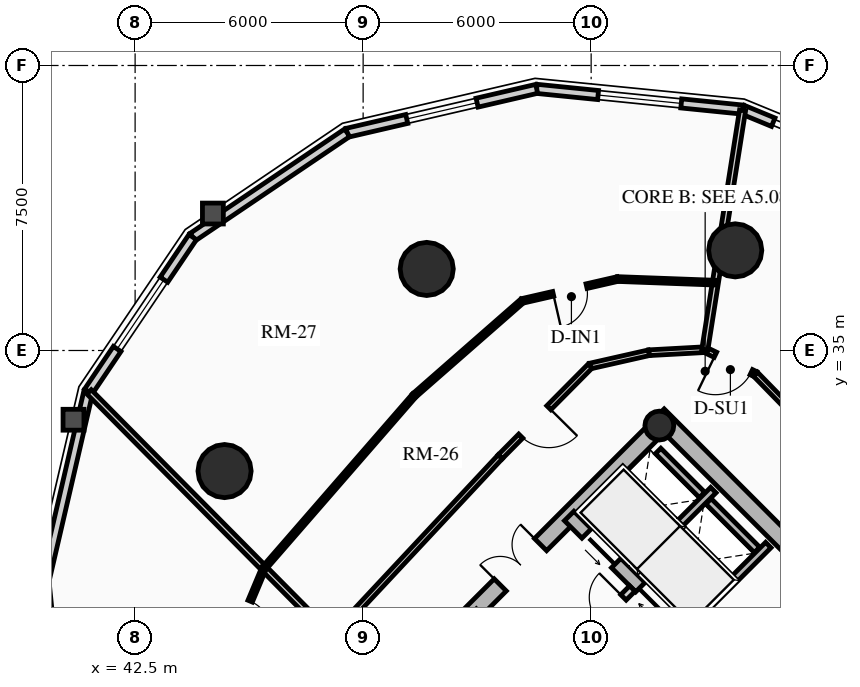
"""IFC4 building model, lengths in metres.
Left out: names, types, materials, properties, quantities, classifications, styles, units other than length and angle.
Written with IfcOpenShell. Run it as: python <this file> out.ifc"""

import sys

from ifc_helpers import new_model, si_unit, direction, frame, frame_2d, origin, origin_2d, place, context, subcontext, project, spatial, rectangle, circle, hollow_circle, extrude, source, transform, mapped, element, fill, save


model = new_model("IFC4")
c1 = context("Model", 3, precision=1e-05, world=origin(), true_north=direction((0.0, 1.0)))
c2 = subcontext(c1, "Body", "Model", "MODEL_VIEW")
j1 = project(units=[si_unit("LENGTHUNIT", "METRE"), si_unit("PLANEANGLEUNIT", "RADIAN")], contexts=[c1])
p1 = place(None, origin())
s1 = spatial("IfcSite", under=j1, at=p1, CompositionType="ELEMENT")
p2 = place(p1, origin())
s2 = spatial("IfcBuilding", under=s1, at=p2, CompositionType="ELEMENT")
p3 = place(p2, frame((0.0, 0.0, 90.52)))
s3 = spatial("IfcBuildingStorey", under=s2, at=p3, CompositionType="ELEMENT", Elevation=90.52)
p4 = place(p3, frame((66.303, 23.263, 0.0), z_axis=(0.0, 0.0, 1.0), x_axis=(-0.707106781187, 0.707106781187, 0.0)))
e1 = element("IfcWall", 1, at=p4, inside=s3, PredefinedType="SHEAR", context=c2, shape_type="SweptSolid", body=[
    extrude(rectangle(XDim=14.2, YDim=0.45, at=frame_2d((7.1, 0.0))), origin(), (0.0, 0.0, 1.0), 2.91),
])
p5 = place(p3, frame((48.856, 25.578, 0.0), z_axis=(0.0, 0.0, 1.0), x_axis=(0.707106781187, 0.707106781187, 0.0)))
e2 = element("IfcWall", 2, at=p5, inside=s3, PredefinedType="SHEAR", context=c2, shape_type="SweptSolid", body=[
    extrude(rectangle(XDim=10.7, YDim=0.45, at=frame_2d((5.35, 0.0))), origin(), (0.0, 0.0, 1.0), 2.91),
])
m1 = source(origin(), c2, "Body", "SweptSolid", [
    extrude(rectangle(XDim=1.5, YDim=2.02, at=frame_2d((0.75, 1.01))), frame((0.0, 0.235, 0.0), z_axis=(0.0, -1.0, 0.0), x_axis=(1.0, 0.0, 0.0)), (0.0, 0.0, 1.0), 0.47),
])
p6 = place(p5, frame((4.6, 0.0, 0.0)))
e3 = element("IfcOpeningElement", 3, at=p6, cuts=e2, PredefinedType="OPENING", context=c2, shape_type="MappedRepresentation", body=[
    mapped(m1, transform((0.0, 0.0, 0.0), x_axis=(1.0, 0.0, 0.0), y_axis=(0.0, 1.0, 0.0), z_axis=(0.0, 0.0, 1.0), scale=1.0)),
])
p7 = place(p3, frame((63.645, 20.922, 0.0), z_axis=(0.0, 0.0, 1.0), x_axis=(-0.707106781187, 0.707106781187, 0.0)))
e4 = element("IfcWall", 4, at=p7, inside=s3, PredefinedType="SHEAR", context=c2, shape_type="SweptSolid", body=[
    extrude(rectangle(XDim=13.75, YDim=0.35, at=frame_2d((6.875, 0.0))), origin(), (0.0, 0.0, 1.0), 2.91),
])
m2 = source(origin(), c2, "Body", "SweptSolid", [
    extrude(rectangle(XDim=1.1, YDim=2.015, at=frame_2d((0.55, 1.007))), frame((0.0, 0.185, 0.0), z_axis=(0.0, -1.0, 0.0), x_axis=(1.0, 0.0, 0.0)), (0.0, 0.0, 1.0), 0.37),
])
p8 = place(p7, frame((10.0, 0.0, 0.0)))
e5 = element("IfcOpeningElement", 5, at=p8, cuts=e4, PredefinedType="OPENING", context=c2, shape_type="MappedRepresentation", body=[
    mapped(m2, transform((0.0, 0.0, 0.0), x_axis=(1.0, 0.0, 0.0), y_axis=(0.0, 1.0, 0.0), z_axis=(0.0, 0.0, 1.0), scale=1.0)),
])
p9 = place(p7, frame((12.0, 0.0, 0.0)))
e6 = element("IfcOpeningElement", 6, at=p9, cuts=e4, PredefinedType="OPENING", context=c2, shape_type="MappedRepresentation", body=[
    mapped(m2, transform((0.0, 0.0, 0.0), x_axis=(1.0, 0.0, 0.0), y_axis=(0.0, 1.0, 0.0), z_axis=(0.0, 0.0, 1.0), scale=1.0)),
])
m3 = source(origin(), c2, "Body", "SweptSolid", [
    extrude(rectangle(XDim=1.15, YDim=2.02, at=frame_2d((0.575, 1.01))), frame((0.0, 0.185, 0.0), z_axis=(0.0, -1.0, 0.0), x_axis=(1.0, 0.0, 0.0)), (0.0, 0.0, 1.0), 0.37),
])
p10 = place(p7, frame((5.305, 0.0, 0.0)))
e7 = element("IfcOpeningElement", 7, at=p10, cuts=e4, PredefinedType="OPENING", context=c2, shape_type="MappedRepresentation", body=[
    mapped(m3, transform((0.0, 0.0, 0.0), x_axis=(1.0, 0.0, 0.0), y_axis=(0.0, 1.0, 0.0), z_axis=(0.0, 0.0, 1.0), scale=1.0)),
])
p11 = place(p3, frame((56.294, 33.024, 0.0), z_axis=(0.0, 0.0, 1.0), x_axis=(0.707106781187, 0.707106781187, 0.0)))
e8 = element("IfcColumn", 8, at=p11, inside=s3, PredefinedType="COLUMN", context=c2, shape_type="SweptSolid", body=[
    extrude(hollow_circle(Radius=0.38, WallThickness=0.032, at=origin_2d()), origin(), (0.0, 0.0, 1.0), 2.91),
])
for number, where, z_axis, x_axis in (
    (9, (58.291, 37.635, 0.0), (0.0, 0.0, 1.0), (1.0, 0.0, 0.0)),
    (10, (50.173, 37.146, 0.0), (0.0, 0.0, 1.0), (1.0, 0.0, 0.0)),
    (11, (44.854, 31.827, 0.0), (0.0, 0.0, 1.0), (1.0, 0.0, 0.0)),
):
    element("IfcColumn", number, at=place(p3, frame(where, z_axis=z_axis, x_axis=x_axis)), inside=s3, PredefinedType="USERDEFINED", context=c2, shape_type="SweptSolid", body=[
        extrude(circle(Radius=0.7, at=origin_2d()), origin(), (0.0, 0.0, 1.0), 2.91),
    ])
p12 = place(p3, frame((58.487, 41.339, 0.0), z_axis=(0.0, 0.0, 1.0), x_axis=(0.924556017656, -0.381046152345, 0.0)))
e12 = element("IfcWall", 12, at=p12, inside=s3, PredefinedType="SOLIDWALL", context=c2, shape_type="SweptSolid", body=[
    extrude(rectangle(XDim=0.87, YDim=0.24, at=frame_2d((0.435, 0.0))), origin(), (0.0, 0.0, 1.0), 2.179),
])
p13 = place(p3, frame((53.067, 41.885, 0.0), z_axis=(0.0, 0.0, 1.0), x_axis=(0.994971754311, -0.10015591906, 0.0)))
e13 = element("IfcWall", 13, at=p13, inside=s3, PredefinedType="SOLIDWALL", context=c2, shape_type="SweptSolid", body=[
    extrude(rectangle(XDim=5.448, YDim=0.24, at=frame_2d((2.724, 0.0))), origin(), (0.0, 0.0, 1.0), 2.179),
])
m4 = source(origin(), c2, "Body", "SweptSolid", [
    extrude(rectangle(XDim=2.2, YDim=1.35, at=frame_2d((1.1, 0.675))), frame((0.0, 0.13, 0.0), z_axis=(0.0, -1.0, 0.0), x_axis=(1.0, 0.0, 0.0)), (0.0, 0.0, 1.0), 0.26),
])
p14 = place(p13, frame((1.624, 0.0, 0.65)))
e14 = element("IfcOpeningElement", 14, at=p14, cuts=e13, PredefinedType="OPENING", context=c2, shape_type="MappedRepresentation", body=[
    mapped(m4, transform((0.0, 0.0, 0.0), x_axis=(1.0, 0.0, 0.0), y_axis=(0.0, 1.0, 0.0), z_axis=(0.0, 0.0, 1.0), scale=1.0)),
])
p15 = place(p3, frame((48.08, 40.729, 0.0), z_axis=(0.0, 0.0, 1.0), x_axis=(0.974165631126, 0.225834725257, 0.0)))
e15 = element("IfcWall", 15, at=p15, inside=s3, PredefinedType="SOLIDWALL", context=c2, shape_type="SweptSolid", body=[
    extrude(rectangle(XDim=5.119, YDim=0.24, at=frame_2d((2.56, 0.0))), origin(), (0.0, 0.0, 1.0), 2.179),
])
m5 = source(origin(), c2, "Body", "SweptSolid", [
    extrude(rectangle(XDim=1.9, YDim=1.35, at=frame_2d((0.95, 0.675))), frame((0.0, 0.13, 0.0), z_axis=(0.0, -1.0, 0.0), x_axis=(1.0, 0.0, 0.0)), (0.0, 0.0, 1.0), 0.26),
])
p16 = place(p15, frame((1.609, 0.0, 0.65)))
e16 = element("IfcOpeningElement", 16, at=p16, cuts=e15, PredefinedType="OPENING", context=c2, shape_type="MappedRepresentation", body=[
    mapped(m5, transform((0.0, 0.0, 0.0), x_axis=(1.0, 0.0, 0.0), y_axis=(0.0, 1.0, 0.0), z_axis=(0.0, 0.0, 1.0), scale=1.0)),
])
p17 = place(p3, frame((44.015, 37.985, 0.0), z_axis=(0.0, 0.0, 1.0), x_axis=(0.828781148131, 0.559572880421, 0.0)))
e17 = element("IfcWall", 17, at=p17, inside=s3, PredefinedType="SOLIDWALL", context=c2, shape_type="SweptSolid", body=[
    extrude(rectangle(XDim=4.905, YDim=0.24, at=frame_2d((2.452, 0.0))), origin(), (0.0, 0.0, 1.0), 2.179),
])
p18 = place(p3, frame((41.271, 33.92, 0.0), z_axis=(0.0, 0.0, 1.0), x_axis=(0.559572880421, 0.828781148131, 0.0)))
e18 = element("IfcWall", 18, at=p18, inside=s3, PredefinedType="SOLIDWALL", context=c2, shape_type="SweptSolid", body=[
    extrude(rectangle(XDim=4.905, YDim=0.24, at=frame_2d((2.452, 0.0))), origin(), (0.0, 0.0, 1.0), 2.179),
])
p19 = place(p18, frame((1.352, 0.0, 0.65)))
e19 = element("IfcOpeningElement", 19, at=p19, cuts=e18, PredefinedType="OPENING", context=c2, shape_type="MappedRepresentation", body=[
    mapped(m4, transform((0.0, 0.0, 0.0), x_axis=(1.0, 0.0, 0.0), y_axis=(0.0, 1.0, 0.0), z_axis=(0.0, 0.0, 1.0), scale=1.0)),
])
p20 = place(p3, frame((40.115, 28.933, 0.0), z_axis=(0.0, 0.0, 1.0), x_axis=(0.225834725257, 0.974165631126, 0.0)))
e20 = element("IfcWall", 20, at=p20, inside=s3, PredefinedType="SOLIDWALL", context=c2, shape_type="SweptSolid", body=[
    extrude(rectangle(XDim=5.119, YDim=0.24, at=frame_2d((2.56, 0.0))), origin(), (0.0, 0.0, 1.0), 2.179),
])
p21 = place(p3, frame((40.661, 23.513, 0.0), z_axis=(0.0, 0.0, 1.0), x_axis=(-0.10015591906, 0.994971754311, 0.0)))
e21 = element("IfcWall", 21, at=p21, inside=s3, PredefinedType="SOLIDWALL", context=c2, shape_type="SweptSolid", body=[
    extrude(rectangle(XDim=5.448, YDim=0.24, at=frame_2d((2.724, 0.0))), origin(), (0.0, 0.0, 1.0), 2.179),
])
p22 = place(p21, frame((1.774, 0.0, 0.65)))
e22 = element("IfcOpeningElement", 22, at=p22, cuts=e21, PredefinedType="OPENING", context=c2, shape_type="MappedRepresentation", body=[
    mapped(m5, transform((0.0, 0.0, 0.0), x_axis=(1.0, 0.0, 0.0), y_axis=(0.0, 1.0, 0.0), z_axis=(0.0, 0.0, 1.0), scale=1.0)),
])
p23 = place(p3, frame((57.062, 27.781, 0.0), z_axis=(0.0, 0.0, 1.0), x_axis=(0.707106781187, 0.707106781187, 0.0)))
e23 = element("IfcWall", 23, at=p23, inside=s3, PredefinedType="SHEAR", context=c2, shape_type="SweptSolid", body=[
    extrude(rectangle(XDim=2.97, YDim=0.2, at=frame_2d((1.485, 0.0))), origin(), (0.0, 0.0, 1.0), 2.91),
])
p24 = place(p3, frame((55.615, 29.227, 0.0), z_axis=(0.0, 0.0, 1.0), x_axis=(0.707147878904, 0.70706568108, 0.0)))
e24 = element("IfcWall", 24, at=p24, inside=s3, PredefinedType="SHEAR", context=c2, shape_type="SweptSolid", body=[
    extrude(rectangle(XDim=2.97, YDim=0.2, at=frame_2d((1.485, 0.0))), origin(), (0.0, 0.0, 1.0), 2.91),
])
p25 = place(p3, frame((58.865, 29.754, 0.0), z_axis=(0.0, 0.0, 1.0), x_axis=(-0.707174411312, 0.707039144592, 0.0)))
e25 = element("IfcWall", 25, at=p25, inside=s3, PredefinedType="SHEAR", context=c2, shape_type="SweptSolid", body=[
    extrude(rectangle(XDim=1.805, YDim=0.2, at=frame_2d((0.902, 0.0))), origin(), (0.0, 0.0, 1.0), 2.91),
])
p26 = place(p3, frame((57.419, 31.2, 0.0), z_axis=(0.0, 0.0, 1.0), x_axis=(-0.707032117043, 0.707181437447, 0.0)))
e26 = element("IfcWall", 26, at=p26, inside=s3, PredefinedType="SHEAR", context=c2, shape_type="SweptSolid", body=[
    extrude(rectangle(XDim=1.635, YDim=0.2, at=frame_2d((0.817, 0.0))), origin(), (0.0, 0.0, 1.0), 2.91),
])
p27 = place(p3, frame((53.264, 26.416, 0.0), z_axis=(0.0, 0.0, 1.0), x_axis=(0.707106781187, 0.707106781187, 0.0)))
e27 = element("IfcWall", 27, at=p27, inside=s3, PredefinedType="PARTITIONING", context=c2, shape_type="SweptSolid", body=[
    extrude(rectangle(XDim=3.28, YDim=0.2, at=frame_2d((1.64, 0.0))), origin(), (0.0, 0.0, 1.0), 2.655),
])
m6 = source(origin(), c2, "Body", "SweptSolid", [
    extrude(rectangle(XDim=1.0, YDim=2.015, at=frame_2d((0.5, 1.007))), frame((0.0, 0.11, 0.0), z_axis=(0.0, -1.0, 0.0), x_axis=(1.0, 0.0, 0.0)), (0.0, 0.0, 1.0), 0.22),
])
p28 = place(p27, frame((0.14, 0.0, 0.0)))
e28 = element("IfcOpeningElement", 28, at=p28, cuts=e27, PredefinedType="OPENING", context=c2, shape_type="MappedRepresentation", body=[
    mapped(m6, transform((0.0, 0.0, 0.0), x_axis=(1.0, 0.0, 0.0), y_axis=(0.0, 1.0, 0.0), z_axis=(0.0, 0.0, 1.0), scale=1.0)),
])
m7 = source(origin(), c2, "Body", "SweptSolid", [
    extrude(rectangle(XDim=0.9, YDim=2.005, at=frame_2d((0.45, 1.002))), frame((0.0, 0.11, 0.0), z_axis=(0.0, -1.0, 0.0), x_axis=(1.0, 0.0, 0.0)), (0.0, 0.0, 1.0), 0.22),
])
p29 = place(p27, frame((2.05, 0.0, 0.0)))
e29 = element("IfcOpeningElement", 29, at=p29, cuts=e27, PredefinedType="OPENING", context=c2, shape_type="MappedRepresentation", body=[
    mapped(m7, transform((0.0, 0.0, 0.0), x_axis=(1.0, 0.0, 0.0), y_axis=(0.0, 1.0, 0.0), z_axis=(0.0, 0.0, 1.0), scale=1.0)),
])
p30 = place(p3, frame((63.051, 30.051, 0.0), z_axis=(0.0, 0.0, 1.0), x_axis=(-0.698846622234, 0.715271555839, 0.0)))
e30 = element("IfcWall", 30, at=p30, inside=s3, PredefinedType="PARTITIONING", context=c2, shape_type="SweptSolid", body=[
    extrude(rectangle(XDim=6.05, YDim=0.15, at=frame_2d((3.025, 0.0))), origin(), (0.0, 0.0, 1.0), 2.225),
])
p31 = place(p3, frame((58.823, 34.378, 0.0), z_axis=(0.0, 0.0, 1.0), x_axis=(-0.900449137666, 0.434961320668, 0.0)))
e31 = element("IfcWall", 31, at=p31, inside=s3, PredefinedType="PARTITIONING", context=c2, shape_type="SweptSolid", body=[
    extrude(rectangle(XDim=1.479, YDim=0.15, at=frame_2d((0.74, 0.0))), origin(), (0.0, 0.0, 1.0), 2.225),
])
m8 = source(origin(), c2, "Body", "SweptSolid", [
    extrude(rectangle(XDim=1.05, YDim=2.015, at=frame_2d((0.525, 1.007))), frame((0.0, 0.085, 0.0), z_axis=(0.0, -1.0, 0.0), x_axis=(1.0, 0.0, 0.0)), (0.0, 0.0, 1.0), 0.17),
])
p32 = place(p31, frame((0.12, 0.0, 0.0)))
e32 = element("IfcOpeningElement", 32, at=p32, cuts=e31, PredefinedType="OPENING", context=c2, shape_type="MappedRepresentation", body=[
    mapped(m8, transform((0.0, 0.0, 0.0), x_axis=(1.0, 0.0, 0.0), y_axis=(0.0, 1.0, 0.0), z_axis=(0.0, 0.0, 1.0), scale=1.0)),
])
p33 = place(p3, frame((57.491, 35.021, 0.0), z_axis=(0.0, 0.0, 1.0), x_axis=(-0.9985194771, -0.054395347698, 0.0)))
e33 = element("IfcWall", 33, at=p33, inside=s3, PredefinedType="PARTITIONING", context=c2, shape_type="SweptSolid", body=[
    extrude(rectangle(XDim=1.472, YDim=0.15, at=frame_2d((0.736, 0.0))), origin(), (0.0, 0.0, 1.0), 2.225),
])
p34 = place(p3, frame((56.021, 34.941, 0.0), z_axis=(0.0, 0.0, 1.0), x_axis=(-0.975309543901, -0.220842236847, 0.0)))
e34 = element("IfcWall", 34, at=p34, inside=s3, PredefinedType="PARTITIONING", context=c2, shape_type="SweptSolid", body=[
    extrude(rectangle(XDim=1.585, YDim=0.15, at=frame_2d((0.792, 0.0))), origin(), (0.0, 0.0, 1.0), 2.225),
])
p35 = place(p3, frame((54.475, 34.591, 0.0), z_axis=(0.0, 0.0, 1.0), x_axis=(-0.703869646439, -0.710329163714, 0.0)))
e35 = element("IfcWall", 35, at=p35, inside=s3, PredefinedType="PARTITIONING", context=c2, shape_type="SweptSolid", body=[
    extrude(rectangle(XDim=3.364, YDim=0.15, at=frame_2d((1.682, 0.0))), origin(), (0.0, 0.0, 1.0), 2.225),
])
p36 = place(p35, frame((1.546, 0.0, 0.0)))
e36 = element("IfcOpeningElement", 36, at=p36, cuts=e35, PredefinedType="OPENING", context=c2, shape_type="MappedRepresentation", body=[
    mapped(m8, transform((0.0, 0.0, 0.0), x_axis=(1.0, 0.0, 0.0), y_axis=(0.0, 1.0, 0.0), z_axis=(0.0, 0.0, 1.0), scale=1.0)),
])
p37 = place(p3, frame((52.107, 32.202, 0.0), z_axis=(0.0, 0.0, 1.0), x_axis=(-0.682605209028, -0.730787334734, 0.0)))
e37 = element("IfcWall", 37, at=p37, inside=s3, PredefinedType="PARTITIONING", context=c2, shape_type="SweptSolid", body=[
    extrude(rectangle(XDim=6.486, YDim=0.15, at=frame_2d((3.243, 0.0))), origin(), (0.0, 0.0, 1.0), 2.225),
])
p38 = place(p3, frame((57.491, 35.021, 0.0), z_axis=(0.0, 0.0, 1.0), x_axis=(0.155805268746, 0.98778779008, 0.0)))
e38 = element("IfcWall", 38, at=p38, inside=s3, PredefinedType="PARTITIONING", context=c2, shape_type="SweptSolid", body=[
    extrude(rectangle(XDim=6.376, YDim=0.16, at=frame_2d((3.188, 0.0))), origin(), (0.0, 0.0, 1.0), 2.179),
])
p39 = place(p3, frame((47.68, 27.462, 0.0), z_axis=(0.0, 0.0, 1.0), x_axis=(-0.703913074907, 0.710286127539, 0.0)))
e39 = element("IfcWall", 39, at=p39, inside=s3, PredefinedType="PARTITIONING", context=c2, shape_type="SweptSolid", body=[
    extrude(rectangle(XDim=9.079, YDim=0.16, at=frame_2d((4.54, 0.0))), origin(), (0.0, 0.0, 1.0), 2.179),
])
p40 = place(p3, frame((57.769, 36.785, 0.0), z_axis=(0.0, 0.0, 1.0), x_axis=(-0.999316779648, 0.036959084311, 0.0)))
e40 = element("IfcWall", 40, at=p40, inside=s3, PredefinedType="PARTITIONING", context=c2, shape_type="SweptSolid", body=[
    extrude(rectangle(XDim=2.576, YDim=0.125, at=frame_2d((1.288, 0.0))), origin(), (0.0, 0.0, 1.0), 2.292),
])
p41 = place(p3, frame((55.194, 36.88, 0.0), z_axis=(0.0, 0.0, 1.0), x_axis=(-0.97469098149, -0.22355645954, 0.0)))
e41 = element("IfcWall", 41, at=p41, inside=s3, PredefinedType="PARTITIONING", context=c2, shape_type="SweptSolid", body=[
    extrude(rectangle(XDim=2.573, YDim=0.125, at=frame_2d((1.287, 0.0))), origin(), (0.0, 0.0, 1.0), 2.225),
])
m9 = source(origin(), c2, "Body", "SweptSolid", [
    extrude(rectangle(XDim=0.9, YDim=2.005, at=frame_2d((0.45, 1.002))), frame((0.0, 0.073, 0.0), z_axis=(0.0, -1.0, 0.0), x_axis=(1.0, 0.0, 0.0)), (0.0, 0.0, 1.0), 0.145),
])
p42 = place(p41, frame((0.836, 0.0, 0.0)))
e42 = element("IfcOpeningElement", 42, at=p42, cuts=e41, PredefinedType="OPENING", context=c2, shape_type="MappedRepresentation", body=[
    mapped(m9, transform((0.0, 0.0, 0.0), x_axis=(1.0, 0.0, 0.0), y_axis=(0.0, 1.0, 0.0), z_axis=(0.0, 0.0, 1.0), scale=1.0)),
])
p43 = place(p3, frame((52.687, 36.305, 0.0), z_axis=(0.0, 0.0, 1.0), x_axis=(-0.752332345919, -0.658783759123, 0.0)))
e43 = element("IfcWall", 43, at=p43, inside=s3, PredefinedType="PARTITIONING", context=c2, shape_type="SweptSolid", body=[
    extrude(rectangle(XDim=3.776, YDim=0.125, at=frame_2d((1.888, 0.0))), origin(), (0.0, 0.0, 1.0), 2.225),
])
p44 = place(p3, frame((49.845, 33.817, 0.0), z_axis=(0.0, 0.0, 1.0), x_axis=(-0.656101508867, -0.754672650931, 0.0)))
e44 = element("IfcWall", 44, at=p44, inside=s3, PredefinedType="PARTITIONING", context=c2, shape_type="SweptSolid", body=[
    extrude(rectangle(XDim=6.029, YDim=0.125, at=frame_2d((3.014, 0.0))), origin(), (0.0, 0.0, 1.0), 2.225),
])
p45 = place(p3, frame((45.89, 29.268, 0.0), z_axis=(0.0, 0.0, 1.0), x_axis=(-0.387057419757, -0.922055613188, 0.0)))
e45 = element("IfcWall", 45, at=p45, inside=s3, PredefinedType="PARTITIONING", context=c2, shape_type="SweptSolid", body=[
    extrude(rectangle(XDim=2.774, YDim=0.125, at=frame_2d((1.387, 0.0))), origin(), (0.0, 0.0, 1.0), 2.225),
])
p46 = place(p45, frame((0.937, 0.0, 0.0)))
e46 = element("IfcOpeningElement", 46, at=p46, cuts=e45, PredefinedType="OPENING", context=c2, shape_type="MappedRepresentation", body=[
    mapped(m9, transform((0.0, 0.0, 0.0), x_axis=(1.0, 0.0, 0.0), y_axis=(0.0, 1.0, 0.0), z_axis=(0.0, 0.0, 1.0), scale=1.0)),
])
m10 = source(origin(), c2, "Body", "SweptSolid", [
    extrude(rectangle(XDim=2.2, YDim=1.35, at=frame_2d((1.1, 0.675))), frame((0.0, 0.03, 0.0), z_axis=(0.0, -1.0, 0.0), x_axis=(1.0, 0.0, 0.0)), (0.0, 0.0, 1.0), 0.06),
])
p47 = place(p14, origin())
e47 = element("IfcWindow", 47, at=p47, inside=s3, PartitioningType="DOUBLE_PANEL_VERTICAL", PredefinedType="WINDOW", context=c2, shape_type="MappedRepresentation", body=[
    mapped(m10, transform((0.0, 0.0, 0.0), x_axis=(1.0, 0.0, 0.0), y_axis=(0.0, 1.0, 0.0), z_axis=(0.0, 0.0, 1.0), scale=1.0)),
])
fill(e14, e47)
m11 = source(origin(), c2, "Body", "SweptSolid", [
    extrude(rectangle(XDim=1.9, YDim=1.35, at=frame_2d((0.95, 0.675))), frame((0.0, 0.03, 0.0), z_axis=(0.0, -1.0, 0.0), x_axis=(1.0, 0.0, 0.0)), (0.0, 0.0, 1.0), 0.06),
])
p48 = place(p16, origin())
e48 = element("IfcWindow", 48, at=p48, inside=s3, PartitioningType="DOUBLE_PANEL_VERTICAL", PredefinedType="WINDOW", context=c2, shape_type="MappedRepresentation", body=[
    mapped(m11, transform((0.0, 0.0, 0.0), x_axis=(1.0, 0.0, 0.0), y_axis=(0.0, 1.0, 0.0), z_axis=(0.0, 0.0, 1.0), scale=1.0)),
])
fill(e16, e48)
p49 = place(p19, origin())
e49 = element("IfcWindow", 49, at=p49, inside=s3, PartitioningType="DOUBLE_PANEL_VERTICAL", PredefinedType="WINDOW", context=c2, shape_type="MappedRepresentation", body=[
    mapped(m10, transform((0.0, 0.0, 0.0), x_axis=(1.0, 0.0, 0.0), y_axis=(0.0, 1.0, 0.0), z_axis=(0.0, 0.0, 1.0), scale=1.0)),
])
fill(e19, e49)
m12 = source(origin(), c2, "Body", "SweptSolid", [
    extrude(rectangle(XDim=1.1, YDim=2.015, at=frame_2d((0.55, 1.007))), frame((0.0, 0.025, 0.0), z_axis=(0.0, -1.0, 0.0), x_axis=(1.0, 0.0, 0.0)), (0.0, 0.0, 1.0), 0.05),
])
p50 = place(p8, origin())
e50 = element("IfcDoor", 50, at=p50, inside=s3, OperationType="SLIDING_TO_RIGHT", PredefinedType="DOOR", context=c2, shape_type="MappedRepresentation", body=[
    mapped(m12, transform((0.0, 0.0, 0.0), x_axis=(1.0, 0.0, 0.0), y_axis=(0.0, 1.0, 0.0), z_axis=(0.0, 0.0, 1.0), scale=1.0)),
])
fill(e5, e50)
p51 = place(p9, origin())
e51 = element("IfcDoor", 51, at=p51, inside=s3, OperationType="SLIDING_TO_LEFT", PredefinedType="DOOR", context=c2, shape_type="MappedRepresentation", body=[
    mapped(m12, transform((0.0, 0.0, 0.0), x_axis=(1.0, 0.0, 0.0), y_axis=(0.0, 1.0, 0.0), z_axis=(0.0, 0.0, 1.0), scale=1.0)),
])
fill(e6, e51)
m13 = source(origin(), c2, "Body", "SweptSolid", [
    extrude(rectangle(XDim=1.5, YDim=2.02, at=frame_2d((0.75, 1.01))), frame((0.0, 0.025, 0.0), z_axis=(0.0, -1.0, 0.0), x_axis=(1.0, 0.0, 0.0)), (0.0, 0.0, 1.0), 0.05),
])
p52 = place(p6, origin())
e52 = element("IfcDoor", 52, at=p52, inside=s3, OperationType="DOUBLE_DOOR_SINGLE_SWING", PredefinedType="DOOR", context=c2, shape_type="MappedRepresentation", body=[
    mapped(m13, transform((0.0, 0.0, 0.0), x_axis=(1.0, 0.0, 0.0), y_axis=(0.0, 1.0, 0.0), z_axis=(0.0, 0.0, 1.0), scale=1.0)),
])
fill(e3, e52)
m14 = source(origin(), c2, "Body", "SweptSolid", [
    extrude(rectangle(XDim=0.9, YDim=2.005, at=frame_2d((0.45, 1.002))), frame((0.0, 0.025, 0.0), z_axis=(0.0, -1.0, 0.0), x_axis=(1.0, 0.0, 0.0)), (0.0, 0.0, 1.0), 0.05),
])
p53 = place(p29, origin())
e53 = element("IfcDoor", 53, at=p53, inside=s3, OperationType="SINGLE_SWING_RIGHT", PredefinedType="DOOR", context=c2, shape_type="MappedRepresentation", body=[
    mapped(m14, transform((0.0, 0.0, 0.0), x_axis=(1.0, 0.0, 0.0), y_axis=(0.0, 1.0, 0.0), z_axis=(0.0, 0.0, 1.0), scale=1.0)),
])
fill(e29, e53)
m15 = source(origin(), c2, "Body", "SweptSolid", [
    extrude(rectangle(XDim=1.05, YDim=2.015, at=frame_2d((0.525, 1.007))), frame((0.0, 0.025, 0.0), z_axis=(0.0, -1.0, 0.0), x_axis=(1.0, 0.0, 0.0)), (0.0, 0.0, 1.0), 0.05),
])
p54 = place(p36, origin())
e54 = element("IfcDoor", 54, at=p54, inside=s3, OperationType="SINGLE_SWING_LEFT", PredefinedType="DOOR", context=c2, shape_type="MappedRepresentation", body=[
    mapped(m15, transform((0.0, 0.0, 0.0), x_axis=(1.0, 0.0, 0.0), y_axis=(0.0, 1.0, 0.0), z_axis=(0.0, 0.0, 1.0), scale=1.0)),
])
fill(e36, e54)
p55 = place(p42, origin())
e55 = element("IfcDoor", 55, at=p55, inside=s3, OperationType="SINGLE_SWING_RIGHT", PredefinedType="DOOR", context=c2, shape_type="MappedRepresentation", body=[
    mapped(m14, transform((0.0, 0.0, 0.0), x_axis=(1.0, 0.0, 0.0), y_axis=(0.0, 1.0, 0.0), z_axis=(0.0, 0.0, 1.0), scale=1.0)),
])
fill(e42, e55)
p56 = place(p46, origin())
e56 = element("IfcDoor", 56, at=p56, inside=s3, OperationType="SINGLE_SWING_RIGHT", PredefinedType="DOOR", context=c2, shape_type="MappedRepresentation", body=[
    mapped(m14, transform((0.0, 0.0, 0.0), x_axis=(1.0, 0.0, 0.0), y_axis=(0.0, 1.0, 0.0), z_axis=(0.0, 0.0, 1.0), scale=1.0)),
])
fill(e46, e56)
p57 = place(p32, origin())
e57 = element("IfcDoor", 57, at=p57, inside=s3, OperationType="SINGLE_SWING_RIGHT", PredefinedType="DOOR", context=c2, shape_type="MappedRepresentation", body=[
    mapped(m15, transform((0.0, 0.0, 0.0), x_axis=(1.0, 0.0, 0.0), y_axis=(0.0, 1.0, 0.0), z_axis=(0.0, 0.0, 1.0), scale=1.0)),
])
fill(e32, e57)
save(model, sys.argv[1])
